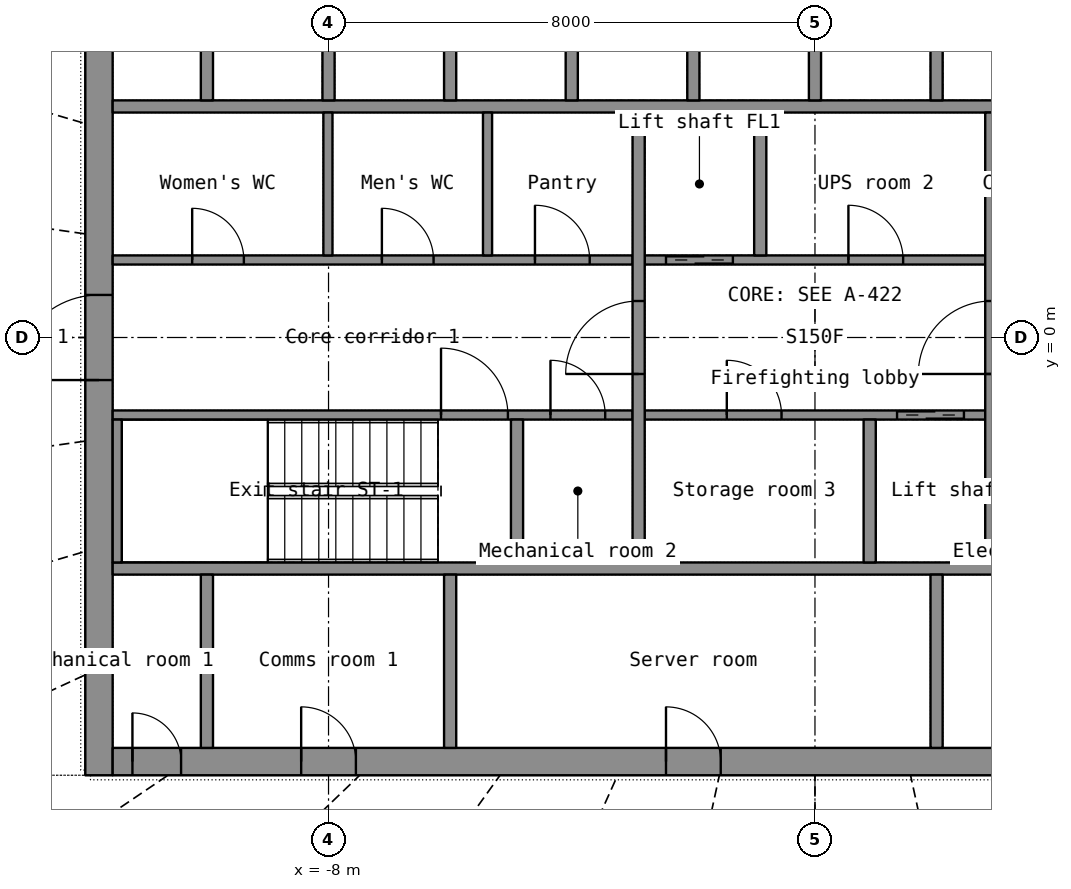
"""IFC4 building model, lengths in metres.
Left out: names, types, materials, properties, quantities, classifications, styles, units other than length and angle.
Written with IfcOpenShell. Run it as: python <this file> out.ifc"""

import sys

from ifc_helpers import new_model, si_unit, direction, frame, frame_2d, origin, place, context, subcontext, project, spatial, rectangle, extrude, element, fill, save


model = new_model("IFC4")
c1 = context("Model", 3, precision=1e-05, world=origin(), true_north=direction((0.0, 1.0)))
c2 = subcontext(c1, "Body", "Model", "MODEL_VIEW")
j1 = project(units=[si_unit("LENGTHUNIT", "METRE"), si_unit("PLANEANGLEUNIT", "RADIAN")], contexts=[c1])
p1 = place(None, origin())
s1 = spatial("IfcSite", under=j1, at=p1, CompositionType="ELEMENT")
p2 = place(p1, origin())
s2 = spatial("IfcBuilding", under=s1, at=p2, CompositionType="ELEMENT")
p3 = place(p2, frame((0.0, 0.0, 164.5)))
s3 = spatial("IfcBuildingStorey", under=s2, at=p3, CompositionType="ELEMENT", Elevation=164.5)
p4 = place(p3, frame((-11.775, -7.2, 0.0), z_axis=(0.0, 0.0, 1.0), x_axis=(0.0, 1.0, 0.0)))
e1 = element("IfcWall", 1, at=p4, inside=s3, PredefinedType="SHEAR", context=c2, shape_type="SweptSolid", body=[
    extrude(rectangle(XDim=14.4, YDim=0.45, at=frame_2d((7.2, 0.0))), origin(), (0.0, 0.0, 1.0), 3.3),
])
p5 = place(p4, frame((6.5, 0.0, 0.0)))
e2 = element("IfcOpeningElement", 2, at=p5, cuts=e1, PredefinedType="OPENING", context=c2, shape_type="SweptSolid", body=[
    extrude(rectangle(XDim=1.4, YDim=2.2, at=frame_2d((0.7, 1.1))), frame((0.0, 0.235, 0.0), z_axis=(0.0, -1.0, 0.0), x_axis=(1.0, 0.0, 0.0)), (0.0, 0.0, 1.0), 0.47),
])
p6 = place(p3, frame((-11.55, -6.975, 0.0), z_axis=(0.0, 0.0, 1.0), x_axis=(1.0, 0.0, 0.0)))
e3 = element("IfcWall", 3, at=p6, inside=s3, PredefinedType="SHEAR", context=c2, shape_type="SweptSolid", body=[
    extrude(rectangle(XDim=23.1, YDim=0.45, at=frame_2d((11.55, 0.0))), origin(), (0.0, 0.0, 1.0), 3.3),
])
p7 = place(p6, frame((20.0, 0.0, 0.0)))
e4 = element("IfcOpeningElement", 4, at=p7, cuts=e3, PredefinedType="OPENING", context=c2, shape_type="SweptSolid", body=[
    extrude(rectangle(XDim=1.1, YDim=2.2, at=frame_2d((0.55, 1.1))), frame((0.0, 0.235, 0.0), z_axis=(0.0, -1.0, 0.0), x_axis=(1.0, 0.0, 0.0)), (0.0, 0.0, 1.0), 0.47),
])
p8 = place(p6, frame((3.1, 0.0, 0.0)))
e5 = element("IfcOpeningElement", 5, at=p8, cuts=e3, PredefinedType="OPENING", context=c2, shape_type="SweptSolid", body=[
    extrude(rectangle(XDim=0.9, YDim=2.1, at=frame_2d((0.45, 1.05))), frame((0.0, 0.235, 0.0), z_axis=(0.0, -1.0, 0.0), x_axis=(1.0, 0.0, 0.0)), (0.0, 0.0, 1.0), 0.47),
])
p9 = place(p6, frame((9.1, 0.0, 0.0)))
e6 = element("IfcOpeningElement", 6, at=p9, cuts=e3, PredefinedType="OPENING", context=c2, shape_type="SweptSolid", body=[
    extrude(rectangle(XDim=0.9, YDim=2.1, at=frame_2d((0.45, 1.05))), frame((0.0, 0.235, 0.0), z_axis=(0.0, -1.0, 0.0), x_axis=(1.0, 0.0, 0.0)), (0.0, 0.0, 1.0), 0.47),
])
p10 = place(p6, frame((16.1, 0.0, 0.0)))
e7 = element("IfcOpeningElement", 7, at=p10, cuts=e3, PredefinedType="OPENING", context=c2, shape_type="SweptSolid", body=[
    extrude(rectangle(XDim=0.9, YDim=2.1, at=frame_2d((0.45, 1.05))), frame((0.0, 0.235, 0.0), z_axis=(0.0, -1.0, 0.0), x_axis=(1.0, 0.0, 0.0)), (0.0, 0.0, 1.0), 0.47),
])
p11 = place(p6, frame((0.325, 0.0, 0.0)))
e8 = element("IfcOpeningElement", 8, at=p11, cuts=e3, PredefinedType="OPENING", context=c2, shape_type="SweptSolid", body=[
    extrude(rectangle(XDim=0.8, YDim=2.05, at=frame_2d((0.4, 1.025))), frame((0.0, 0.235, 0.0), z_axis=(0.0, -1.0, 0.0), x_axis=(1.0, 0.0, 0.0)), (0.0, 0.0, 1.0), 0.47),
])
p12 = place(p6, frame((21.975, 0.0, 0.0)))
e9 = element("IfcOpeningElement", 9, at=p12, cuts=e3, PredefinedType="OPENING", context=c2, shape_type="SweptSolid", body=[
    extrude(rectangle(XDim=0.8, YDim=2.05, at=frame_2d((0.4, 1.025))), frame((0.0, 0.235, 0.0), z_axis=(0.0, -1.0, 0.0), x_axis=(1.0, 0.0, 0.0)), (0.0, 0.0, 1.0), 0.47),
])
for number, where, z_axis, x_axis in (
    (10, (-11.55, -3.8, 0.0), (0.0, 0.0, 1.0), (1.0, 0.0, 0.0)),
    (11, (-11.55, 3.8, 0.0), (0.0, 0.0, 1.0), (1.0, 0.0, 0.0)),
):
    element("IfcWall", number, at=place(p3, frame(where, z_axis=z_axis, x_axis=x_axis)), inside=s3, PredefinedType="SHEAR", context=c2, shape_type="SweptSolid", body=[
        extrude(rectangle(XDim=23.1, YDim=0.2, at=frame_2d((11.55, 0.0))), origin(), (0.0, 0.0, 1.0), 3.3),
    ])
p13 = place(p3, frame((-10.0, -6.75, 0.0), z_axis=(0.0, 0.0, 1.0), x_axis=(0.0, 1.0, 0.0)))
e12 = element("IfcWall", 12, at=p13, inside=s3, PredefinedType="SHEAR", context=c2, shape_type="SweptSolid", body=[
    extrude(rectangle(XDim=2.85, YDim=0.2, at=frame_2d((1.425, 0.0))), origin(), (0.0, 0.0, 1.0), 3.3),
])
for number, where, z_axis, x_axis in (
    (13, (-6.0, -6.75, 0.0), (0.0, 0.0, 1.0), (0.0, 1.0, 0.0)),
    (14, (2.0, -6.75, 0.0), (0.0, 0.0, 1.0), (0.0, 1.0, 0.0)),
):
    element("IfcWall", number, at=place(p3, frame(where, z_axis=z_axis, x_axis=x_axis)), inside=s3, PredefinedType="PARTITIONING", context=c2, shape_type="SweptSolid", body=[
        extrude(rectangle(XDim=2.85, YDim=0.2, at=frame_2d((1.425, 0.0))), origin(), (0.0, 0.0, 1.0), 3.3),
    ])
for number, where, z_axis, x_axis in (
    (15, (-10.0, 3.9, 0.0), (0.0, 0.0, 1.0), (0.0, 1.0, 0.0)),
    (16, (-8.0, 3.9, 0.0), (0.0, 0.0, 1.0), (0.0, 1.0, 0.0)),
    (17, (-6.0, 3.9, 0.0), (0.0, 0.0, 1.0), (0.0, 1.0, 0.0)),
    (18, (-4.0, 3.9, 0.0), (0.0, 0.0, 1.0), (0.0, 1.0, 0.0)),
    (19, (-2.0, 3.9, 0.0), (0.0, 0.0, 1.0), (0.0, 1.0, 0.0)),
    (20, (0.0, 3.9, 0.0), (0.0, 0.0, 1.0), (0.0, 1.0, 0.0)),
    (21, (2.0, 3.9, 0.0), (0.0, 0.0, 1.0), (0.0, 1.0, 0.0)),
):
    element("IfcWall", number, at=place(p3, frame(where, z_axis=z_axis, x_axis=x_axis)), inside=s3, PredefinedType="SHEAR", context=c2, shape_type="SweptSolid", body=[
        extrude(rectangle(XDim=2.85, YDim=0.2, at=frame_2d((1.425, 0.0))), origin(), (0.0, 0.0, 1.0), 3.3),
    ])
p14 = place(p3, frame((-11.55, -1.275, 0.0), z_axis=(0.0, 0.0, 1.0), x_axis=(1.0, 0.0, 0.0)))
e22 = element("IfcWall", 22, at=p14, inside=s3, PredefinedType="SHEAR", context=c2, shape_type="SweptSolid", body=[
    extrude(rectangle(XDim=8.55, YDim=0.15, at=frame_2d((4.275, 0.0))), origin(), (0.0, 0.0, 1.0), 3.3),
])
p15 = place(p14, frame((5.4, 0.0, 0.0)))
e23 = element("IfcOpeningElement", 23, at=p15, cuts=e22, PredefinedType="OPENING", context=c2, shape_type="SweptSolid", body=[
    extrude(rectangle(XDim=1.1, YDim=2.15, at=frame_2d((0.55, 1.075))), frame((0.0, 0.085, 0.0), z_axis=(0.0, -1.0, 0.0), x_axis=(1.0, 0.0, 0.0)), (0.0, 0.0, 1.0), 0.17),
])
p16 = place(p14, frame((7.2, 0.0, 0.0)))
e24 = element("IfcOpeningElement", 24, at=p16, cuts=e22, PredefinedType="OPENING", context=c2, shape_type="SweptSolid", body=[
    extrude(rectangle(XDim=0.9, YDim=2.1, at=frame_2d((0.45, 1.05))), frame((0.0, 0.085, 0.0), z_axis=(0.0, -1.0, 0.0), x_axis=(1.0, 0.0, 0.0)), (0.0, 0.0, 1.0), 0.17),
])
p17 = place(p3, frame((-2.8, -1.275, 0.0), z_axis=(0.0, 0.0, 1.0), x_axis=(1.0, 0.0, 0.0)))
e25 = element("IfcWall", 25, at=p17, inside=s3, PredefinedType="SHEAR", context=c2, shape_type="SweptSolid", body=[
    extrude(rectangle(XDim=5.6, YDim=0.15, at=frame_2d((2.8, 0.0))), origin(), (0.0, 0.0, 1.0), 3.3),
])
p18 = place(p17, frame((4.15, 0.0, 0.0)))
e26 = element("IfcOpeningElement", 26, at=p18, cuts=e25, PredefinedType="OPENING", context=c2, shape_type="SweptSolid", body=[
    extrude(rectangle(XDim=1.1, YDim=2.2, at=frame_2d((0.55, 1.1))), frame((0.0, 0.085, 0.0), z_axis=(0.0, -1.0, 0.0), x_axis=(1.0, 0.0, 0.0)), (0.0, 0.0, 1.0), 0.17),
])
p19 = place(p17, frame((1.35, 0.0, 0.0)))
e27 = element("IfcOpeningElement", 27, at=p19, cuts=e25, PredefinedType="OPENING", context=c2, shape_type="SweptSolid", body=[
    extrude(rectangle(XDim=0.9, YDim=2.1, at=frame_2d((0.45, 1.05))), frame((0.0, 0.085, 0.0), z_axis=(0.0, -1.0, 0.0), x_axis=(1.0, 0.0, 0.0)), (0.0, 0.0, 1.0), 0.17),
])
p20 = place(p3, frame((-11.55, 1.275, 0.0), z_axis=(0.0, 0.0, 1.0), x_axis=(1.0, 0.0, 0.0)))
e28 = element("IfcWall", 28, at=p20, inside=s3, PredefinedType="PARTITIONING", context=c2, shape_type="SweptSolid", body=[
    extrude(rectangle(XDim=8.55, YDim=0.15, at=frame_2d((4.275, 0.0))), origin(), (0.0, 0.0, 1.0), 3.3),
])
p21 = place(p20, frame((1.308, 0.0, 0.0)))
e29 = element("IfcOpeningElement", 29, at=p21, cuts=e28, PredefinedType="OPENING", context=c2, shape_type="SweptSolid", body=[
    extrude(rectangle(XDim=0.85, YDim=2.1, at=frame_2d((0.425, 1.05))), frame((0.0, 0.085, 0.0), z_axis=(0.0, -1.0, 0.0), x_axis=(1.0, 0.0, 0.0)), (0.0, 0.0, 1.0), 0.17),
])
p22 = place(p20, frame((4.427, 0.0, 0.0)))
e30 = element("IfcOpeningElement", 30, at=p22, cuts=e28, PredefinedType="OPENING", context=c2, shape_type="SweptSolid", body=[
    extrude(rectangle(XDim=0.85, YDim=2.1, at=frame_2d((0.425, 1.05))), frame((0.0, 0.085, 0.0), z_axis=(0.0, -1.0, 0.0), x_axis=(1.0, 0.0, 0.0)), (0.0, 0.0, 1.0), 0.17),
])
p23 = place(p20, frame((6.945, 0.0, 0.0)))
e31 = element("IfcOpeningElement", 31, at=p23, cuts=e28, PredefinedType="OPENING", context=c2, shape_type="SweptSolid", body=[
    extrude(rectangle(XDim=0.9, YDim=2.1, at=frame_2d((0.45, 1.05))), frame((0.0, 0.085, 0.0), z_axis=(0.0, -1.0, 0.0), x_axis=(1.0, 0.0, 0.0)), (0.0, 0.0, 1.0), 0.17),
])
p24 = place(p3, frame((-2.8, 1.275, 0.0), z_axis=(0.0, 0.0, 1.0), x_axis=(1.0, 0.0, 0.0)))
e32 = element("IfcWall", 32, at=p24, inside=s3, PredefinedType="SHEAR", context=c2, shape_type="SweptSolid", body=[
    extrude(rectangle(XDim=5.6, YDim=0.15, at=frame_2d((2.8, 0.0))), origin(), (0.0, 0.0, 1.0), 3.3),
])
p25 = place(p24, frame((0.35, 0.0, 0.0)))
e33 = element("IfcOpeningElement", 33, at=p25, cuts=e32, PredefinedType="OPENING", context=c2, shape_type="SweptSolid", body=[
    extrude(rectangle(XDim=1.1, YDim=2.2, at=frame_2d((0.55, 1.1))), frame((0.0, 0.085, 0.0), z_axis=(0.0, -1.0, 0.0), x_axis=(1.0, 0.0, 0.0)), (0.0, 0.0, 1.0), 0.17),
])
p26 = place(p24, frame((3.35, 0.0, 0.0)))
e34 = element("IfcOpeningElement", 34, at=p26, cuts=e32, PredefinedType="OPENING", context=c2, shape_type="SweptSolid", body=[
    extrude(rectangle(XDim=0.9, YDim=2.1, at=frame_2d((0.45, 1.05))), frame((0.0, 0.085, 0.0), z_axis=(0.0, -1.0, 0.0), x_axis=(1.0, 0.0, 0.0)), (0.0, 0.0, 1.0), 0.17),
])
p27 = place(p3, frame((-2.9, -3.7, 0.0), z_axis=(0.0, 0.0, 1.0), x_axis=(0.0, 1.0, 0.0)))
e35 = element("IfcWall", 35, at=p27, inside=s3, PredefinedType="SHEAR", context=c2, shape_type="SweptSolid", body=[
    extrude(rectangle(XDim=7.4, YDim=0.2, at=frame_2d((3.7, 0.0))), origin(), (0.0, 0.0, 1.0), 3.3),
])
p28 = place(p27, frame((3.1, 0.0, 0.0)))
e36 = element("IfcOpeningElement", 36, at=p28, cuts=e35, PredefinedType="OPENING", context=c2, shape_type="SweptSolid", body=[
    extrude(rectangle(XDim=1.2, YDim=2.2, at=frame_2d((0.6, 1.1))), frame((0.0, 0.11, 0.0), z_axis=(0.0, -1.0, 0.0), x_axis=(1.0, 0.0, 0.0)), (0.0, 0.0, 1.0), 0.22),
])
p29 = place(p3, frame((2.9, -3.7, 0.0), z_axis=(0.0, 0.0, 1.0), x_axis=(0.0, 1.0, 0.0)))
e37 = element("IfcWall", 37, at=p29, inside=s3, PredefinedType="SHEAR", context=c2, shape_type="SweptSolid", body=[
    extrude(rectangle(XDim=7.4, YDim=0.2, at=frame_2d((3.7, 0.0))), origin(), (0.0, 0.0, 1.0), 3.3),
])
p30 = place(p29, frame((3.1, 0.0, 0.0)))
e38 = element("IfcOpeningElement", 38, at=p30, cuts=e37, PredefinedType="OPENING", context=c2, shape_type="SweptSolid", body=[
    extrude(rectangle(XDim=1.2, YDim=2.2, at=frame_2d((0.6, 1.1))), frame((0.0, 0.11, 0.0), z_axis=(0.0, -1.0, 0.0), x_axis=(1.0, 0.0, 0.0)), (0.0, 0.0, 1.0), 0.22),
])
for number, where, z_axis, x_axis in (
    (39, (-0.9, 1.35, 0.0), (0.0, 0.0, 1.0), (0.0, 1.0, 0.0)),
    (40, (0.9, -3.7, 0.0), (0.0, 0.0, 1.0), (0.0, 1.0, 0.0)),
):
    element("IfcWall", number, at=place(p3, frame(where, z_axis=z_axis, x_axis=x_axis)), inside=s3, PredefinedType="SHEAR", context=c2, shape_type="SweptSolid", body=[
        extrude(rectangle(XDim=2.35, YDim=0.2, at=frame_2d((1.175, 0.0))), origin(), (0.0, 0.0, 1.0), 3.3),
    ])
p31 = place(p3, frame((-11.475, -3.7, 0.0), z_axis=(0.0, 0.0, 1.0), x_axis=(0.0, 1.0, 0.0)))
e41 = element("IfcWall", 41, at=p31, inside=s3, PredefinedType="SHEAR", context=c2, shape_type="SweptSolid", body=[
    extrude(rectangle(XDim=2.35, YDim=0.15, at=frame_2d((1.175, 0.0))), origin(), (0.0, 0.0, 1.0), 3.3),
])
p32 = place(p3, frame((-4.9, -3.7, 0.0), z_axis=(0.0, 0.0, 1.0), x_axis=(0.0, 1.0, 0.0)))
e42 = element("IfcWall", 42, at=p32, inside=s3, PredefinedType="SHEAR", context=c2, shape_type="SweptSolid", body=[
    extrude(rectangle(XDim=2.35, YDim=0.2, at=frame_2d((1.175, 0.0))), origin(), (0.0, 0.0, 1.0), 3.3),
])
for number, where, z_axis, x_axis in (
    (43, (-8.01, 1.35, 0.0), (0.0, 0.0, 1.0), (0.0, 1.0, 0.0)),
    (44, (-5.385, 1.35, 0.0), (0.0, 0.0, 1.0), (0.0, 1.0, 0.0)),
):
    element("IfcWall", number, at=place(p3, frame(where, z_axis=z_axis, x_axis=x_axis)), inside=s3, PredefinedType="PARTITIONING", context=c2, shape_type="SweptSolid", body=[
        extrude(rectangle(XDim=2.35, YDim=0.15, at=frame_2d((1.175, 0.0))), origin(), (0.0, 0.0, 1.0), 3.3),
    ])
p33 = place(p8, origin())
e45 = element("IfcDoor", 45, at=p33, inside=s3, OperationType="SINGLE_SWING_LEFT", PredefinedType="DOOR", context=c2, shape_type="SweptSolid", body=[
    extrude(rectangle(XDim=0.9, YDim=2.1, at=frame_2d((0.45, 1.05))), frame((0.0, 0.025, 0.0), z_axis=(0.0, -1.0, 0.0), x_axis=(1.0, 0.0, 0.0)), (0.0, 0.0, 1.0), 0.05),
])
fill(e5, e45)
p34 = place(p9, origin())
e46 = element("IfcDoor", 46, at=p34, inside=s3, OperationType="SINGLE_SWING_LEFT", PredefinedType="DOOR", context=c2, shape_type="SweptSolid", body=[
    extrude(rectangle(XDim=0.9, YDim=2.1, at=frame_2d((0.45, 1.05))), frame((0.0, 0.025, 0.0), z_axis=(0.0, -1.0, 0.0), x_axis=(1.0, 0.0, 0.0)), (0.0, 0.0, 1.0), 0.05),
])
fill(e6, e46)
p35 = place(p11, origin())
e47 = element("IfcDoor", 47, at=p35, inside=s3, OperationType="SINGLE_SWING_LEFT", PredefinedType="DOOR", context=c2, shape_type="SweptSolid", body=[
    extrude(rectangle(XDim=0.8, YDim=2.05, at=frame_2d((0.4, 1.025))), frame((0.0, 0.025, 0.0), z_axis=(0.0, -1.0, 0.0), x_axis=(1.0, 0.0, 0.0)), (0.0, 0.0, 1.0), 0.05),
])
fill(e8, e47)
p36 = place(p5, origin())
e48 = element("IfcDoor", 48, at=p36, inside=s3, OperationType="DOUBLE_DOOR_SINGLE_SWING", PredefinedType="DOOR", context=c2, shape_type="SweptSolid", body=[
    extrude(rectangle(XDim=1.4, YDim=2.2, at=frame_2d((0.7, 1.1))), frame((0.0, 0.025, 0.0), z_axis=(0.0, -1.0, 0.0), x_axis=(1.0, 0.0, 0.0)), (0.0, 0.0, 1.0), 0.05),
])
fill(e2, e48)
p37 = place(p28, origin())
e49 = element("IfcDoor", 49, at=p37, inside=s3, OperationType="SINGLE_SWING_LEFT", PredefinedType="DOOR", context=c2, shape_type="SweptSolid", body=[
    extrude(rectangle(XDim=1.2, YDim=2.2, at=frame_2d((0.6, 1.1))), frame((0.0, 0.025, 0.0), z_axis=(0.0, -1.0, 0.0), x_axis=(1.0, 0.0, 0.0)), (0.0, 0.0, 1.0), 0.05),
])
fill(e36, e49)
p38 = place(p30, origin())
e50 = element("IfcDoor", 50, at=p38, inside=s3, OperationType="SINGLE_SWING_LEFT", PredefinedType="DOOR", context=c2, shape_type="SweptSolid", body=[
    extrude(rectangle(XDim=1.2, YDim=2.2, at=frame_2d((0.6, 1.1))), frame((0.0, 0.025, 0.0), z_axis=(0.0, -1.0, 0.0), x_axis=(1.0, 0.0, 0.0)), (0.0, 0.0, 1.0), 0.05),
])
fill(e38, e50)
p39 = place(p25, origin())
e51 = element("IfcDoor", 51, at=p39, inside=s3, OperationType="DOUBLE_DOOR_SLIDING", PredefinedType="DOOR", context=c2, shape_type="SweptSolid", body=[
    extrude(rectangle(XDim=1.1, YDim=2.2, at=frame_2d((0.55, 1.1))), frame((0.0, 0.025, 0.0), z_axis=(0.0, -1.0, 0.0), x_axis=(1.0, 0.0, 0.0)), (0.0, 0.0, 1.0), 0.05),
])
fill(e33, e51)
p40 = place(p18, origin())
e52 = element("IfcDoor", 52, at=p40, inside=s3, OperationType="DOUBLE_DOOR_SLIDING", PredefinedType="DOOR", context=c2, shape_type="SweptSolid", body=[
    extrude(rectangle(XDim=1.1, YDim=2.2, at=frame_2d((0.55, 1.1))), frame((0.0, 0.025, 0.0), z_axis=(0.0, -1.0, 0.0), x_axis=(1.0, 0.0, 0.0)), (0.0, 0.0, 1.0), 0.05),
])
fill(e26, e52)
p41 = place(p15, origin())
e53 = element("IfcDoor", 53, at=p41, inside=s3, OperationType="SINGLE_SWING_LEFT", PredefinedType="DOOR", context=c2, shape_type="SweptSolid", body=[
    extrude(rectangle(XDim=1.1, YDim=2.15, at=frame_2d((0.55, 1.075))), frame((0.0, 0.025, 0.0), z_axis=(0.0, -1.0, 0.0), x_axis=(1.0, 0.0, 0.0)), (0.0, 0.0, 1.0), 0.05),
])
fill(e23, e53)
p42 = place(p21, origin())
e54 = element("IfcDoor", 54, at=p42, inside=s3, OperationType="SINGLE_SWING_LEFT", PredefinedType="DOOR", context=c2, shape_type="SweptSolid", body=[
    extrude(rectangle(XDim=0.85, YDim=2.1, at=frame_2d((0.425, 1.05))), frame((0.0, 0.025, 0.0), z_axis=(0.0, -1.0, 0.0), x_axis=(1.0, 0.0, 0.0)), (0.0, 0.0, 1.0), 0.05),
])
fill(e29, e54)
p43 = place(p22, origin())
e55 = element("IfcDoor", 55, at=p43, inside=s3, OperationType="SINGLE_SWING_LEFT", PredefinedType="DOOR", context=c2, shape_type="SweptSolid", body=[
    extrude(rectangle(XDim=0.85, YDim=2.1, at=frame_2d((0.425, 1.05))), frame((0.0, 0.025, 0.0), z_axis=(0.0, -1.0, 0.0), x_axis=(1.0, 0.0, 0.0)), (0.0, 0.0, 1.0), 0.05),
])
fill(e30, e55)
p44 = place(p23, origin())
e56 = element("IfcDoor", 56, at=p44, inside=s3, OperationType="SINGLE_SWING_LEFT", PredefinedType="DOOR", context=c2, shape_type="SweptSolid", body=[
    extrude(rectangle(XDim=0.9, YDim=2.1, at=frame_2d((0.45, 1.05))), frame((0.0, 0.025, 0.0), z_axis=(0.0, -1.0, 0.0), x_axis=(1.0, 0.0, 0.0)), (0.0, 0.0, 1.0), 0.05),
])
fill(e31, e56)
p45 = place(p26, origin())
e57 = element("IfcDoor", 57, at=p45, inside=s3, OperationType="SINGLE_SWING_LEFT", PredefinedType="DOOR", context=c2, shape_type="SweptSolid", body=[
    extrude(rectangle(XDim=0.9, YDim=2.1, at=frame_2d((0.45, 1.05))), frame((0.0, 0.025, 0.0), z_axis=(0.0, -1.0, 0.0), x_axis=(1.0, 0.0, 0.0)), (0.0, 0.0, 1.0), 0.05),
])
fill(e34, e57)
p46 = place(p19, origin())
e58 = element("IfcDoor", 58, at=p46, inside=s3, OperationType="SINGLE_SWING_LEFT", PredefinedType="DOOR", context=c2, shape_type="SweptSolid", body=[
    extrude(rectangle(XDim=0.9, YDim=2.1, at=frame_2d((0.45, 1.05))), frame((0.0, 0.025, 0.0), z_axis=(0.0, -1.0, 0.0), x_axis=(1.0, 0.0, 0.0)), (0.0, 0.0, 1.0), 0.05),
])
fill(e27, e58)
p47 = place(p16, origin())
e59 = element("IfcDoor", 59, at=p47, inside=s3, OperationType="SINGLE_SWING_LEFT", PredefinedType="DOOR", context=c2, shape_type="SweptSolid", body=[
    extrude(rectangle(XDim=0.9, YDim=2.1, at=frame_2d((0.45, 1.05))), frame((0.0, 0.025, 0.0), z_axis=(0.0, -1.0, 0.0), x_axis=(1.0, 0.0, 0.0)), (0.0, 0.0, 1.0), 0.05),
])
fill(e24, e59)
save(model, sys.argv[1])
